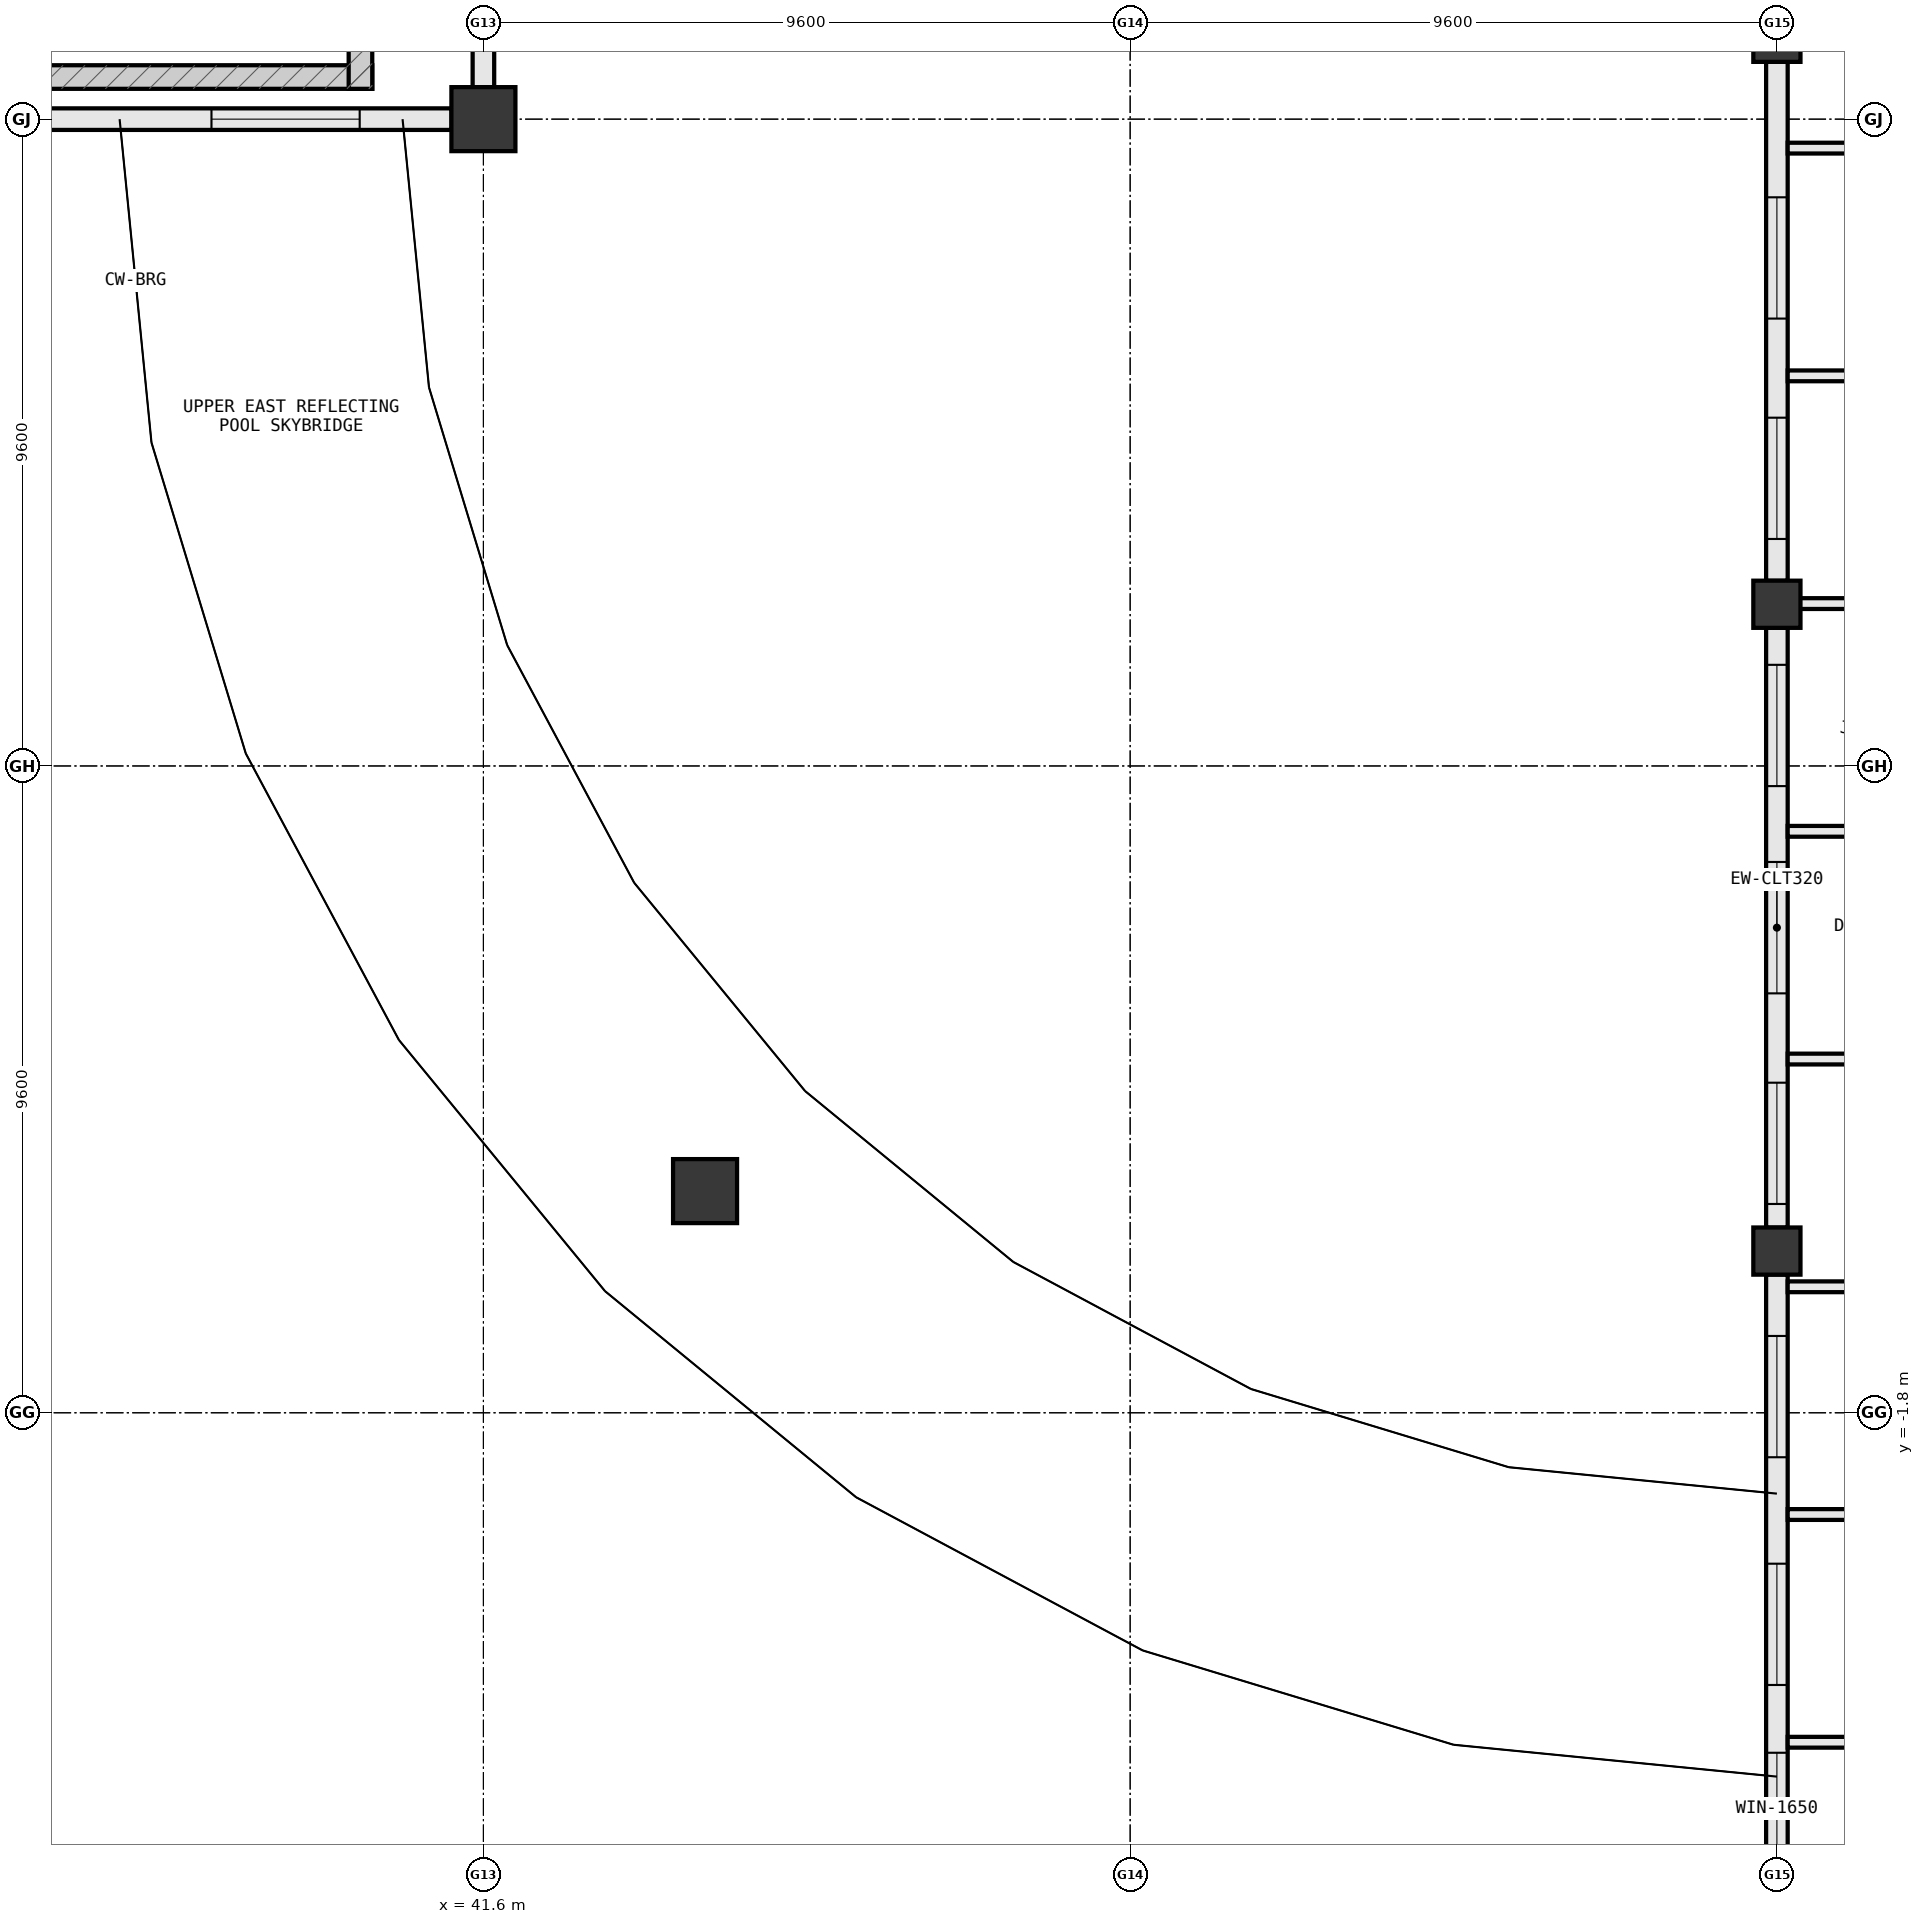
"""IFC4 building model, lengths in metres.
Left out: names, types, materials, properties, quantities, classifications, styles, units other than length and angle.
Written with IfcOpenShell. Run it as: python <this file> out.ifc"""

import sys

from ifc_helpers import new_model, si_unit, direction, frame, frame_2d, origin, origin_2d, place, context, subcontext, project, spatial, rectangle, circle, extrude, element, fill, save


model = new_model("IFC4")
c1 = context("Model", 3, precision=1e-05, world=origin(), true_north=direction((0.0, 1.0)))
c2 = subcontext(c1, "Body", "Model", "MODEL_VIEW")
j1 = project(units=[si_unit("LENGTHUNIT", "METRE"), si_unit("PLANEANGLEUNIT", "RADIAN")], contexts=[c1])
p1 = place(None, origin())
s1 = spatial("IfcSite", under=j1, at=p1, CompositionType="ELEMENT")
p2 = place(p1, origin())
s2 = spatial("IfcBuilding", under=s1, at=p2, CompositionType="ELEMENT")
p3 = place(p2, frame((0.0, 0.0, 10.8)))
s3 = spatial("IfcBuildingStorey", under=s2, at=p3, CompositionType="ELEMENT", Elevation=10.8)
p4 = place(p3, frame((41.6, 17.4, 0.0), z_axis=(0.0, 0.0, 1.0), x_axis=(1.0, 0.0, 0.0)))
e1 = element("IfcColumn", 1, at=p4, inside=s3, PredefinedType="COLUMN", context=c2, shape_type="SweptSolid", body=[
    extrude(circle(Radius=0.475, at=origin_2d()), origin(), (0.0, 0.0, 1.0), 5.4),
])
for number, where, z_axis, x_axis in (
    (2, (60.8, 0.6, 0.0), (0.0, 0.0, 1.0), (1.0, 0.0, 0.0)),
    (3, (60.8, 10.2, 0.0), (0.0, 0.0, 1.0), (1.0, 0.0, 0.0)),
    (4, (60.8, 18.6, 0.0), (0.0, 0.0, 1.0), (1.0, 0.0, 0.0)),
):
    element("IfcColumn", number, at=place(p3, frame(where, z_axis=z_axis, x_axis=x_axis)), inside=s3, PredefinedType="COLUMN", context=c2, shape_type="SweptSolid", body=[
        extrude(rectangle(XDim=0.7, YDim=0.7, at=origin_2d()), origin(), (0.0, 0.0, 1.0), 5.4),
    ])
p5 = place(p3, frame((44.89, 1.49, 0.0), z_axis=(0.0, 0.0, 1.0), x_axis=(1.0, 0.0, 0.0)))
e5 = element("IfcColumn", 5, at=p5, inside=s3, PredefinedType="COLUMN", context=c2, shape_type="SweptSolid", body=[
    extrude(circle(Radius=0.475, at=origin_2d()), origin(), (0.0, 0.0, 1.0), 5.4),
])
p6 = place(p3, frame((31.273, 17.4, 0.0), z_axis=(0.0, 0.0, 1.0), x_axis=(1.0, 0.0, 0.0)))
e6 = element("IfcWall", 6, at=p6, inside=s3, PredefinedType="STANDARD", context=c2, shape_type="SweptSolid", body=[
    extrude(rectangle(XDim=9.854, YDim=0.32, at=frame_2d((4.927, 0.0))), origin(), (0.0, 0.0, 1.0), 4.016),
])
p7 = place(p6, frame((1.364, 0.0, 0.85)))
e7 = element("IfcOpeningElement", 7, at=p7, cuts=e6, PredefinedType="OPENING", context=c2, shape_type="SweptSolid", body=[
    extrude(rectangle(XDim=2.2, YDim=2.0, at=frame_2d((1.1, 1.0))), frame((0.0, 0.172, 0.0), z_axis=(0.0, -1.0, 0.0), x_axis=(1.0, 0.0, 0.0)), (0.0, 0.0, 1.0), 0.344),
])
p8 = place(p6, frame((6.291, 0.0, 0.85)))
e8 = element("IfcOpeningElement", 8, at=p8, cuts=e6, PredefinedType="OPENING", context=c2, shape_type="SweptSolid", body=[
    extrude(rectangle(XDim=2.2, YDim=2.0, at=frame_2d((1.1, 1.0))), frame((0.0, 0.172, 0.0), z_axis=(0.0, -1.0, 0.0), x_axis=(1.0, 0.0, 0.0)), (0.0, 0.0, 1.0), 0.344),
])
p9 = place(p3, frame((41.6, 17.873, 0.0), z_axis=(0.0, 0.0, 1.0), x_axis=(0.0, 1.0, 0.0)))
e9 = element("IfcWall", 9, at=p9, inside=s3, PredefinedType="STANDARD", context=c2, shape_type="SweptSolid", body=[
    extrude(rectangle(XDim=8.704, YDim=0.32, at=frame_2d((4.352, 0.0))), origin(), (0.0, 0.0, 1.0), 4.102),
])
p10 = place(p9, frame((3.452, 0.0, 0.85)))
e10 = element("IfcOpeningElement", 10, at=p10, cuts=e9, PredefinedType="OPENING", context=c2, shape_type="SweptSolid", body=[
    extrude(rectangle(XDim=1.8, YDim=1.85, at=frame_2d((0.9, 0.925))), frame((0.0, 0.172, 0.0), z_axis=(0.0, -1.0, 0.0), x_axis=(1.0, 0.0, 0.0)), (0.0, 0.0, 1.0), 0.344),
])
p11 = place(p3, frame((60.8, 18.252, 0.0), z_axis=(0.0, 0.0, 1.0), x_axis=(0.0, -1.0, 0.0)))
e11 = element("IfcWall", 11, at=p11, inside=s3, PredefinedType="STANDARD", context=c2, shape_type="SweptSolid", body=[
    extrude(rectangle(XDim=7.704, YDim=0.32, at=frame_2d((3.852, 0.0))), origin(), (0.0, 0.0, 1.0), 4.255),
])
p12 = place(p11, frame((5.283, 0.0, 0.85)))
e12 = element("IfcOpeningElement", 12, at=p12, cuts=e11, PredefinedType="OPENING", context=c2, shape_type="SweptSolid", body=[
    extrude(rectangle(XDim=1.8, YDim=1.85, at=frame_2d((0.9, 0.925))), frame((0.0, 0.172, 0.0), z_axis=(0.0, -1.0, 0.0), x_axis=(1.0, 0.0, 0.0)), (0.0, 0.0, 1.0), 0.344),
])
p13 = place(p11, frame((2.012, 0.0, 0.85)))
e13 = element("IfcOpeningElement", 13, at=p13, cuts=e11, PredefinedType="OPENING", context=c2, shape_type="SweptSolid", body=[
    extrude(rectangle(XDim=1.8, YDim=1.85, at=frame_2d((0.9, 0.925))), frame((0.0, 0.172, 0.0), z_axis=(0.0, -1.0, 0.0), x_axis=(1.0, 0.0, 0.0)), (0.0, 0.0, 1.0), 0.344),
])
p14 = place(p3, frame((60.8, 9.852, 0.0), z_axis=(0.0, 0.0, 1.0), x_axis=(0.0, -1.0, 0.0)))
e14 = element("IfcWall", 14, at=p14, inside=s3, PredefinedType="STANDARD", context=c2, shape_type="SweptSolid", body=[
    extrude(rectangle(XDim=8.904, YDim=0.32, at=frame_2d((4.452, 0.0))), origin(), (0.0, 0.0, 1.0), 4.155),
])
p15 = place(p14, frame((3.477, 0.0, 0.85)))
e15 = element("IfcOpeningElement", 15, at=p15, cuts=e14, PredefinedType="OPENING", context=c2, shape_type="SweptSolid", body=[
    extrude(rectangle(XDim=1.95, YDim=1.9, at=frame_2d((0.975, 0.95))), frame((0.0, 0.172, 0.0), z_axis=(0.0, -1.0, 0.0), x_axis=(1.0, 0.0, 0.0)), (0.0, 0.0, 1.0), 0.344),
])
p16 = place(p14, frame((6.753, 0.0, 0.85)))
e16 = element("IfcOpeningElement", 16, at=p16, cuts=e14, PredefinedType="OPENING", context=c2, shape_type="SweptSolid", body=[
    extrude(rectangle(XDim=1.8, YDim=1.85, at=frame_2d((0.9, 0.925))), frame((0.0, 0.172, 0.0), z_axis=(0.0, -1.0, 0.0), x_axis=(1.0, 0.0, 0.0)), (0.0, 0.0, 1.0), 0.344),
])
p17 = place(p14, frame((0.551, 0.0, 0.85)))
e17 = element("IfcOpeningElement", 17, at=p17, cuts=e14, PredefinedType="OPENING", context=c2, shape_type="SweptSolid", body=[
    extrude(rectangle(XDim=1.8, YDim=1.85, at=frame_2d((0.9, 0.925))), frame((0.0, 0.172, 0.0), z_axis=(0.0, -1.0, 0.0), x_axis=(1.0, 0.0, 0.0)), (0.0, 0.0, 1.0), 0.344),
])
p18 = place(p3, frame((60.8, 0.252, 0.0), z_axis=(0.0, 0.0, 1.0), x_axis=(0.0, -1.0, 0.0)))
e18 = element("IfcWall", 18, at=p18, inside=s3, PredefinedType="STANDARD", context=c2, shape_type="SweptSolid", body=[
    extrude(rectangle(XDim=8.904, YDim=0.32, at=frame_2d((4.452, 0.0))), origin(), (0.0, 0.0, 1.0), 4.155),
])
p19 = place(p18, frame((7.098, 0.0, 0.85)))
e19 = element("IfcOpeningElement", 19, at=p19, cuts=e18, PredefinedType="OPENING", context=c2, shape_type="SweptSolid", body=[
    extrude(rectangle(XDim=1.65, YDim=1.8, at=frame_2d((0.825, 0.9))), frame((0.0, 0.172, 0.0), z_axis=(0.0, -1.0, 0.0), x_axis=(1.0, 0.0, 0.0)), (0.0, 0.0, 1.0), 0.344),
])
p20 = place(p18, frame((4.292, 0.0, 0.85)))
e20 = element("IfcOpeningElement", 20, at=p20, cuts=e18, PredefinedType="OPENING", context=c2, shape_type="SweptSolid", body=[
    extrude(rectangle(XDim=1.8, YDim=1.85, at=frame_2d((0.9, 0.925))), frame((0.0, 0.172, 0.0), z_axis=(0.0, -1.0, 0.0), x_axis=(1.0, 0.0, 0.0)), (0.0, 0.0, 1.0), 0.344),
])
p21 = place(p18, frame((0.912, 0.0, 0.85)))
e21 = element("IfcOpeningElement", 21, at=p21, cuts=e18, PredefinedType="OPENING", context=c2, shape_type="SweptSolid", body=[
    extrude(rectangle(XDim=1.8, YDim=1.85, at=frame_2d((0.9, 0.925))), frame((0.0, 0.172, 0.0), z_axis=(0.0, -1.0, 0.0), x_axis=(1.0, 0.0, 0.0)), (0.0, 0.0, 1.0), 0.344),
])
p22 = place(p3, frame((27.85, 18.025, 0.0), z_axis=(0.0, 0.0, 1.0), x_axis=(1.0, 0.0, 0.0)))
e22 = element("IfcWall", 22, at=p22, inside=s3, PredefinedType="SHEAR", context=c2, shape_type="SweptSolid", body=[
    extrude(rectangle(XDim=12.1, YDim=0.35, at=frame_2d((6.05, 0.0))), origin(), (0.0, 0.0, 1.0), 4.8),
])
p23 = place(p3, frame((39.775, 17.85, 0.0), z_axis=(0.0, 0.0, 1.0), x_axis=(0.0, 1.0, 0.0)))
e23 = element("IfcWall", 23, at=p23, inside=s3, PredefinedType="SHEAR", context=c2, shape_type="SweptSolid", body=[
    extrude(rectangle(XDim=5.3, YDim=0.35, at=frame_2d((2.65, 0.0))), origin(), (0.0, 0.0, 1.0), 4.8),
])
for number, where, z_axis, x_axis in (
    (24, (60.96, -6.69, 0.0), (0.0, 0.0, 1.0), (1.0, 0.0, 0.0)),
    (25, (60.96, -3.31, 0.0), (0.0, 0.0, 1.0), (1.0, 0.0, 0.0)),
    (26, (60.96, 0.07, 0.0), (0.0, 0.0, 1.0), (1.0, 0.0, 0.0)),
    (27, (60.96, 3.45, 0.0), (0.0, 0.0, 1.0), (1.0, 0.0, 0.0)),
    (28, (60.96, 6.83, 0.0), (0.0, 0.0, 1.0), (1.0, 0.0, 0.0)),
):
    element("IfcWall", number, at=place(p3, frame(where, z_axis=z_axis, x_axis=x_axis)), inside=s3, PredefinedType="PARTITIONING", context=c2, shape_type="SweptSolid", body=[
        extrude(rectangle(XDim=6.94, YDim=0.16, at=frame_2d((3.47, 0.0))), origin(), (0.0, 0.0, 1.0), 4.8),
    ])
p24 = place(p3, frame((60.96, 10.21, 0.0), z_axis=(0.0, 0.0, 1.0), x_axis=(1.0, 0.0, 0.0)))
e29 = element("IfcWall", 29, at=p24, inside=s3, PredefinedType="PARTITIONING", context=c2, shape_type="SweptSolid", body=[
    extrude(rectangle(XDim=6.94, YDim=0.16, at=frame_2d((3.47, 0.0))), origin(), (0.0, 0.0, 1.0), 4.175),
])
for number, where, z_axis, x_axis in (
    (30, (60.96, 13.59, 0.0), (0.0, 0.0, 1.0), (1.0, 0.0, 0.0)),
    (31, (60.96, 16.97, 0.0), (0.0, 0.0, 1.0), (1.0, 0.0, 0.0)),
):
    element("IfcWall", number, at=place(p3, frame(where, z_axis=z_axis, x_axis=x_axis)), inside=s3, PredefinedType="PARTITIONING", context=c2, shape_type="SweptSolid", body=[
        extrude(rectangle(XDim=6.94, YDim=0.16, at=frame_2d((3.47, 0.0))), origin(), (0.0, 0.0, 1.0), 4.8),
    ])
p25 = place(p8, origin())
e32 = element("IfcWindow", 32, at=p25, inside=s3, PartitioningType="DOUBLE_PANEL_VERTICAL", PredefinedType="WINDOW", context=c2, shape_type="SweptSolid", body=[
    extrude(rectangle(XDim=2.2, YDim=2.0, at=frame_2d((1.1, 1.0))), frame((0.0, 0.03, 0.0), z_axis=(0.0, -1.0, 0.0), x_axis=(1.0, 0.0, 0.0)), (0.0, 0.0, 1.0), 0.06),
])
fill(e8, e32)
p26 = place(p15, origin())
e33 = element("IfcWindow", 33, at=p26, inside=s3, PartitioningType="DOUBLE_PANEL_VERTICAL", PredefinedType="WINDOW", context=c2, shape_type="SweptSolid", body=[
    extrude(rectangle(XDim=1.95, YDim=1.9, at=frame_2d((0.975, 0.95))), frame((0.0, 0.03, 0.0), z_axis=(0.0, -1.0, 0.0), x_axis=(1.0, 0.0, 0.0)), (0.0, 0.0, 1.0), 0.06),
])
fill(e15, e33)
p27 = place(p19, origin())
e34 = element("IfcWindow", 34, at=p27, inside=s3, PartitioningType="SINGLE_PANEL", PredefinedType="WINDOW", context=c2, shape_type="SweptSolid", body=[
    extrude(rectangle(XDim=1.65, YDim=1.8, at=frame_2d((0.825, 0.9))), frame((0.0, 0.03, 0.0), z_axis=(0.0, -1.0, 0.0), x_axis=(1.0, 0.0, 0.0)), (0.0, 0.0, 1.0), 0.06),
])
fill(e19, e34)
p28 = place(p20, origin())
e35 = element("IfcWindow", 35, at=p28, inside=s3, PartitioningType="SINGLE_PANEL", PredefinedType="WINDOW", context=c2, shape_type="SweptSolid", body=[
    extrude(rectangle(XDim=1.8, YDim=1.85, at=frame_2d((0.9, 0.925))), frame((0.0, 0.03, 0.0), z_axis=(0.0, -1.0, 0.0), x_axis=(1.0, 0.0, 0.0)), (0.0, 0.0, 1.0), 0.06),
])
fill(e20, e35)
p29 = place(p21, origin())
e36 = element("IfcWindow", 36, at=p29, inside=s3, PartitioningType="SINGLE_PANEL", PredefinedType="WINDOW", context=c2, shape_type="SweptSolid", body=[
    extrude(rectangle(XDim=1.8, YDim=1.85, at=frame_2d((0.9, 0.925))), frame((0.0, 0.03, 0.0), z_axis=(0.0, -1.0, 0.0), x_axis=(1.0, 0.0, 0.0)), (0.0, 0.0, 1.0), 0.06),
])
fill(e21, e36)
p30 = place(p16, origin())
e37 = element("IfcWindow", 37, at=p30, inside=s3, PartitioningType="SINGLE_PANEL", PredefinedType="WINDOW", context=c2, shape_type="SweptSolid", body=[
    extrude(rectangle(XDim=1.8, YDim=1.85, at=frame_2d((0.9, 0.925))), frame((0.0, 0.03, 0.0), z_axis=(0.0, -1.0, 0.0), x_axis=(1.0, 0.0, 0.0)), (0.0, 0.0, 1.0), 0.06),
])
fill(e16, e37)
p31 = place(p17, origin())
e38 = element("IfcWindow", 38, at=p31, inside=s3, PartitioningType="SINGLE_PANEL", PredefinedType="WINDOW", context=c2, shape_type="SweptSolid", body=[
    extrude(rectangle(XDim=1.8, YDim=1.85, at=frame_2d((0.9, 0.925))), frame((0.0, 0.03, 0.0), z_axis=(0.0, -1.0, 0.0), x_axis=(1.0, 0.0, 0.0)), (0.0, 0.0, 1.0), 0.06),
])
fill(e17, e38)
p32 = place(p12, origin())
e39 = element("IfcWindow", 39, at=p32, inside=s3, PartitioningType="SINGLE_PANEL", PredefinedType="WINDOW", context=c2, shape_type="SweptSolid", body=[
    extrude(rectangle(XDim=1.8, YDim=1.85, at=frame_2d((0.9, 0.925))), frame((0.0, 0.03, 0.0), z_axis=(0.0, -1.0, 0.0), x_axis=(1.0, 0.0, 0.0)), (0.0, 0.0, 1.0), 0.06),
])
fill(e12, e39)
p33 = place(p13, origin())
e40 = element("IfcWindow", 40, at=p33, inside=s3, PartitioningType="SINGLE_PANEL", PredefinedType="WINDOW", context=c2, shape_type="SweptSolid", body=[
    extrude(rectangle(XDim=1.8, YDim=1.85, at=frame_2d((0.9, 0.925))), frame((0.0, 0.03, 0.0), z_axis=(0.0, -1.0, 0.0), x_axis=(1.0, 0.0, 0.0)), (0.0, 0.0, 1.0), 0.06),
])
fill(e13, e40)
save(model, sys.argv[1])
